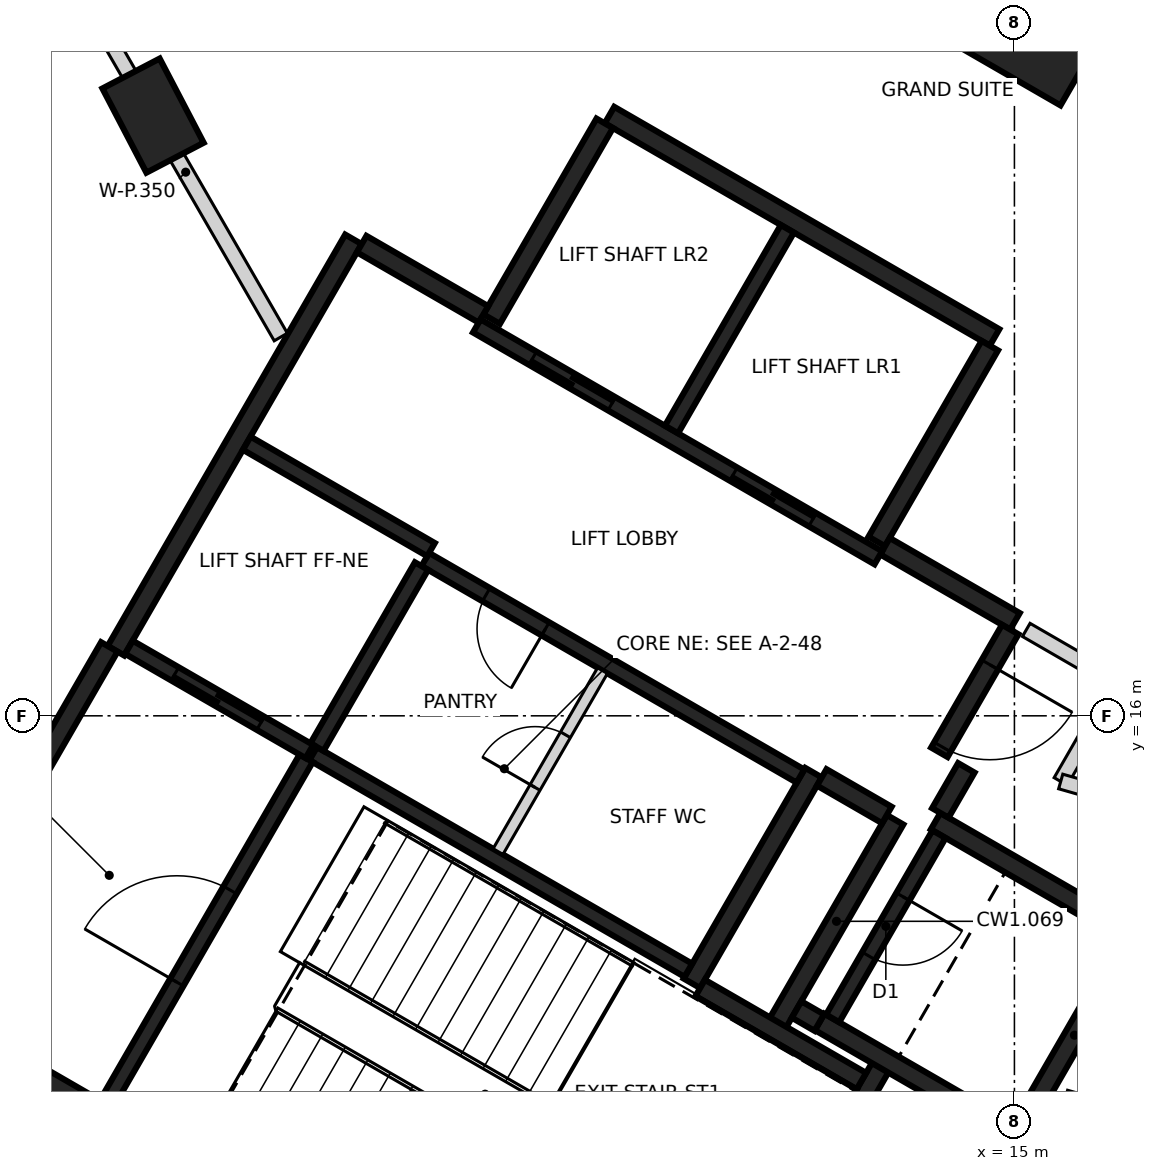
"""IFC4 building model, lengths in metres.
Left out: names, types, materials, properties, quantities, classifications, styles, units other than length and angle.
Written with IfcOpenShell. Run it as: python <this file> out.ifc"""

import sys

from ifc_helpers import new_model, si_unit, direction, frame, frame_2d, origin, origin_2d, place, context, subcontext, project, spatial, rectangle, extrude, element, fill, save


model = new_model("IFC4")
c1 = context("Model", 3, precision=1e-05, world=origin(), true_north=direction((0.0, 1.0)))
c2 = subcontext(c1, "Body", "Model", "MODEL_VIEW")
j1 = project(units=[si_unit("LENGTHUNIT", "METRE"), si_unit("PLANEANGLEUNIT", "RADIAN")], contexts=[c1])
p1 = place(None, origin())
s1 = spatial("IfcSite", under=j1, at=p1, CompositionType="ELEMENT")
p2 = place(p1, origin())
s2 = spatial("IfcBuilding", under=s1, at=p2, CompositionType="ELEMENT")
p3 = place(p2, frame((0.0, 0.0, 161.2)))
s3 = spatial("IfcBuildingStorey", under=s2, at=p3, CompositionType="ELEMENT", Elevation=161.2)
p4 = place(p3, frame((3.667, 23.896, -0.4), z_axis=(0.0, 0.0, 1.0), x_axis=(-0.463006774365, 0.886354740999, 0.0)))
e1 = element("IfcColumn", 1, at=p4, inside=s3, PredefinedType="COLUMN", context=c2, shape_type="SweptSolid", body=[
    extrude(rectangle(XDim=1.25, YDim=0.85, at=origin_2d()), origin(), (0.0, 0.0, 1.0), 2.884),
])
p5 = place(p3, frame((15.207, 26.34, -0.4), z_axis=(0.0, 0.0, 1.0), x_axis=(0.5, 0.866025403784, 0.0)))
e2 = element("IfcColumn", 2, at=p5, inside=s3, PredefinedType="COLUMN", context=c2, shape_type="SweptSolid", body=[
    extrude(rectangle(XDim=3.6, YDim=3.0, at=origin_2d()), origin(), (0.0, 0.0, 1.0), 3.6),
])
p6 = place(p3, frame((10.42, 6.498, 0.0), z_axis=(0.0, 0.0, 1.0), x_axis=(-0.866021906294, 0.500006057782, 0.0)))
e3 = element("IfcWall", 3, at=p6, inside=s3, PredefinedType="SHEAR", context=c2, shape_type="SweptSolid", body=[
    extrude(rectangle(XDim=11.55, YDim=0.25, at=frame_2d((5.775, 0.0))), origin(), (0.0, 0.0, 1.0), 3.2),
])
p7 = place(p6, frame((10.025, 0.0, 0.0)))
e4 = element("IfcOpeningElement", 4, at=p7, cuts=e3, PredefinedType="OPENING", context=c2, shape_type="SweptSolid", body=[
    extrude(rectangle(XDim=1.2, YDim=2.1, at=frame_2d((0.6, 1.05))), frame((0.0, 0.135, 0.0), z_axis=(0.0, -1.0, 0.0), x_axis=(1.0, 0.0, 0.0)), (0.0, 0.0, 1.0), 0.27),
])
p8 = place(p6, frame((8.725, 0.0, 0.0)))
e5 = element("IfcOpeningElement", 5, at=p8, cuts=e3, PredefinedType="OPENING", context=c2, shape_type="SweptSolid", body=[
    extrude(rectangle(XDim=1.2, YDim=2.1, at=frame_2d((0.6, 1.05))), frame((0.0, 0.135, 0.0), z_axis=(0.0, -1.0, 0.0), x_axis=(1.0, 0.0, 0.0)), (0.0, 0.0, 1.0), 0.27),
])
p9 = place(p3, frame((3.179, 16.856, 0.0), z_axis=(0.0, 0.0, 1.0), x_axis=(0.500004234368, 0.866022959057, 0.0)))
e6 = element("IfcWall", 6, at=p9, inside=s3, PredefinedType="SHEAR", context=c2, shape_type="SweptSolid", body=[
    extrude(rectangle(XDim=6.25, YDim=0.25, at=frame_2d((3.125, 0.0))), origin(), (0.0, 0.0, 1.0), 3.2),
])
p10 = place(p3, frame((9.673, 23.903, 0.0), z_axis=(0.0, 0.0, 1.0), x_axis=(0.86603616409, -0.499981362141, 0.0)))
e7 = element("IfcWall", 7, at=p10, inside=s3, PredefinedType="SHEAR", context=c2, shape_type="SweptSolid", body=[
    extrude(rectangle(XDim=5.85, YDim=0.25, at=frame_2d((2.925, 0.0))), origin(), (0.0, 0.0, 1.0), 3.2),
])
p11 = place(p3, frame((0.48, 12.381, 0.0), z_axis=(0.0, 0.0, 1.0), x_axis=(0.49999885962, 0.866026062182, 0.0)))
e8 = element("IfcWall", 8, at=p11, inside=s3, PredefinedType="SHEAR", context=c2, shape_type="SweptSolid", body=[
    extrude(rectangle(XDim=5.225, YDim=0.25, at=frame_2d((2.612, 0.0))), origin(), (0.0, 0.0, 1.0), 3.2),
])
p12 = place(p3, frame((13.238, 11.378, 0.0), z_axis=(0.0, 0.0, 1.0), x_axis=(-0.500008851346, -0.866020293397, 0.0)))
e9 = element("IfcWall", 9, at=p12, inside=s3, PredefinedType="SHEAR", context=c2, shape_type="SweptSolid", body=[
    extrude(rectangle(XDim=5.51, YDim=0.25, at=frame_2d((2.755, 0.0))), origin(), (0.0, 0.0, 1.0), 3.2),
])
p13 = place(p3, frame((12.357, 15.252, 0.0), z_axis=(0.0, 0.0, 1.0), x_axis=(-0.500028443584, -0.866008981251, 0.0)))
e10 = element("IfcWall", 10, at=p13, inside=s3, PredefinedType="SHEAR", context=c2, shape_type="SweptSolid", body=[
    extrude(rectangle(XDim=3.2, YDim=0.25, at=frame_2d((1.6, 0.0))), origin(), (0.0, 0.0, 1.0), 3.2),
])
for number, where, z_axis, x_axis in (
    (11, (8.123, 21.219, 0.0), (0.0, 0.0, 1.0), (0.5, 0.866, 0.0)),
    (12, (14.676, 20.87, 0.0), (0.0, 0.0, 1.0), (-0.5, -0.866, 0.0)),
):
    element("IfcWall", number, at=place(p3, frame(where, z_axis=z_axis, x_axis=x_axis)), inside=s3, PredefinedType="SHEAR", context=c2, shape_type="SweptSolid", body=[
        extrude(rectangle(XDim=2.975, YDim=0.25, at=frame_2d((1.487, 0.0))), origin(), (0.0, 0.0, 1.0), 3.2),
    ])
p14 = place(p3, frame((16.552, 13.119, 0.0), z_axis=(0.0, 0.0, 1.0), x_axis=(-0.499978833458, -0.866037623948, 0.0)))
e13 = element("IfcWall", 13, at=p14, inside=s3, PredefinedType="SHEAR", context=c2, shape_type="SweptSolid", body=[
    extrude(rectangle(XDim=3.05, YDim=0.25, at=frame_2d((1.525, 0.0))), origin(), (0.0, 0.0, 1.0), 3.2),
])
p15 = place(p3, frame((14.918, 10.54, 0.0), z_axis=(0.0, 0.0, 1.0), x_axis=(-0.866063538972, 0.499933942099, 0.0)))
e14 = element("IfcWall", 14, at=p15, inside=s3, PredefinedType="SHEAR", context=c2, shape_type="SweptSolid", body=[
    extrude(rectangle(XDim=2.865, YDim=0.25, at=frame_2d((1.432, 0.0))), origin(), (0.0, 0.0, 1.0), 3.2),
])
p16 = place(p3, frame((13.963, 14.614, 0.0), z_axis=(0.0, 0.0, 1.0), x_axis=(0.866042235819, -0.499970844928, 0.0)))
e15 = element("IfcWall", 15, at=p16, inside=s3, PredefinedType="SHEAR", context=c2, shape_type="SweptSolid", body=[
    extrude(rectangle(XDim=2.865, YDim=0.25, at=frame_2d((1.432, 0.0))), origin(), (0.0, 0.0, 1.0), 3.2),
])
p17 = place(p3, frame((11.888, 11.961, 0.0), z_axis=(0.0, 0.0, 1.0), x_axis=(0.500003324108, 0.866023484601, 0.0)))
e16 = element("IfcWall", 16, at=p17, inside=s3, PredefinedType="SHEAR", context=c2, shape_type="SweptSolid", body=[
    extrude(rectangle(XDim=3.085, YDim=0.25, at=frame_2d((1.542, 0.0))), origin(), (0.0, 0.0, 1.0), 3.2),
])
p18 = place(p3, frame((10.865, 12.418, 0.0), z_axis=(0.0, 0.0, 1.0), x_axis=(0.866026229868, -0.499998569178, 0.0)))
e17 = element("IfcWall", 17, at=p18, inside=s3, PredefinedType="SHEAR", context=c2, shape_type="SweptSolid", body=[
    extrude(rectangle(XDim=2.449, YDim=0.25, at=frame_2d((1.225, 0.0))), origin(), (0.0, 0.0, 1.0), 3.2),
])
p19 = place(p3, frame((13.297, 18.231, 0.0), z_axis=(0.0, 0.0, 1.0), x_axis=(0.866043531843, -0.499968599967, 0.0)))
e18 = element("IfcWall", 18, at=p19, inside=s3, PredefinedType="SHEAR", context=c2, shape_type="SweptSolid", body=[
    extrude(rectangle(XDim=1.975, YDim=0.25, at=frame_2d((0.987, 0.0))), origin(), (0.0, 0.0, 1.0), 3.2),
])
p20 = place(p3, frame((6.413, 22.206, 0.0), z_axis=(0.0, 0.0, 1.0), x_axis=(0.866016279763, -0.500015802937, 0.0)))
e19 = element("IfcWall", 19, at=p20, inside=s3, PredefinedType="SHEAR", context=c2, shape_type="SweptSolid", body=[
    extrude(rectangle(XDim=1.849, YDim=0.25, at=frame_2d((0.925, 0.0))), origin(), (0.0, 0.0, 1.0), 3.2),
])
p21 = place(p3, frame((14.945, 17.135, 0.0), z_axis=(0.0, 0.0, 1.0), x_axis=(-0.499983108224, -0.866035156036, 0.0)))
e20 = element("IfcWall", 20, at=p21, inside=s3, PredefinedType="SHEAR", context=c2, shape_type="SweptSolid", body=[
    extrude(rectangle(XDim=1.865, YDim=0.25, at=frame_2d((0.932, 0.0))), origin(), (0.0, 0.0, 1.0), 3.2),
])
p22 = place(p21, frame((0.535, 0.0, 0.0)))
e21 = element("IfcOpeningElement", 21, at=p22, cuts=e20, PredefinedType="OPENING", context=c2, shape_type="SweptSolid", body=[
    extrude(rectangle(XDim=1.25, YDim=2.1, at=frame_2d((0.625, 1.05))), frame((0.0, 0.135, 0.0), z_axis=(0.0, -1.0, 0.0), x_axis=(1.0, 0.0, 0.0)), (0.0, 0.0, 1.0), 0.27),
])
p23 = place(p3, frame((13.322, 14.695, 0.0), z_axis=(0.0, 0.0, 1.0), x_axis=(-0.866017078145, 0.500014420154, 0.0)))
e22 = element("IfcWall", 22, at=p23, inside=s3, PredefinedType="SHEAR", context=c2, shape_type="SweptSolid", body=[
    extrude(rectangle(XDim=0.989, YDim=0.25, at=frame_2d((0.495, 0.0))), origin(), (0.0, 0.0, 1.0), 3.2),
])
p24 = place(p3, frame((14.368, 15.315, 0.0), z_axis=(0.0, 0.0, 1.0), x_axis=(-0.499897359611, -0.866084655132, 0.0)))
e23 = element("IfcWall", 23, at=p24, inside=s3, PredefinedType="SHEAR", context=c2, shape_type="SweptSolid", body=[
    extrude(rectangle(XDim=0.685, YDim=0.25, at=frame_2d((0.342, 0.0))), origin(), (0.0, 0.0, 1.0), 3.2),
])
p25 = place(p3, frame((12.433, 11.964, 0.0), z_axis=(0.0, 0.0, 1.0), x_axis=(-0.866055875208, 0.499947218231, 0.0)))
e24 = element("IfcWall", 24, at=p25, inside=s3, PredefinedType="SHEAR", context=c2, shape_type="SweptSolid", body=[
    extrude(rectangle(XDim=0.345, YDim=0.25, at=frame_2d((0.172, 0.0))), origin(), (0.0, 0.0, 1.0), 3.2),
])
p26 = place(p3, frame((13.21, 18.08, 0.0), z_axis=(0.0, 0.0, 1.0), x_axis=(-0.866030299012, 0.499991521122, 0.0)))
e25 = element("IfcWall", 25, at=p26, inside=s3, PredefinedType="SHEAR", context=c2, shape_type="SweptSolid", body=[
    extrude(rectangle(XDim=6.1, YDim=0.2, at=frame_2d((3.05, 0.0))), origin(), (0.0, 0.0, 1.0), 3.2),
])
p27 = place(p26, frame((1.0, 0.0, 0.0)))
e26 = element("IfcOpeningElement", 26, at=p27, cuts=e25, PredefinedType="OPENING", context=c2, shape_type="SweptSolid", body=[
    extrude(rectangle(XDim=1.2, YDim=2.1, at=frame_2d((0.6, 1.05))), frame((0.0, 0.11, 0.0), z_axis=(0.0, -1.0, 0.0), x_axis=(1.0, 0.0, 0.0)), (0.0, 0.0, 1.0), 0.22),
])
p28 = place(p26, frame((4.05, 0.0, 0.0)))
e27 = element("IfcOpeningElement", 27, at=p28, cuts=e25, PredefinedType="OPENING", context=c2, shape_type="SweptSolid", body=[
    extrude(rectangle(XDim=1.2, YDim=2.1, at=frame_2d((0.6, 1.05))), frame((0.0, 0.11, 0.0), z_axis=(0.0, -1.0, 0.0), x_axis=(1.0, 0.0, 0.0)), (0.0, 0.0, 1.0), 0.22),
])
p29 = place(p3, frame((5.775, 15.502, 0.0), z_axis=(0.0, 0.0, 1.0), x_axis=(0.866020080793, -0.500009219579, 0.0)))
e28 = element("IfcWall", 28, at=p29, inside=s3, PredefinedType="SHEAR", context=c2, shape_type="SweptSolid", body=[
    extrude(rectangle(XDim=5.699, YDim=0.2, at=frame_2d((2.85, 0.0))), origin(), (0.0, 0.0, 1.0), 3.2),
])
p30 = place(p3, frame((12.185, 15.207, 0.0), z_axis=(0.0, 0.0, 1.0), x_axis=(-0.866020080793, 0.500009219579, 0.0)))
e29 = element("IfcWall", 29, at=p30, inside=s3, PredefinedType="SHEAR", context=c2, shape_type="SweptSolid", body=[
    extrude(rectangle(XDim=5.699, YDim=0.2, at=frame_2d((2.85, 0.0))), origin(), (0.0, 0.0, 1.0), 3.2),
])
p31 = place(p30, frame((3.874, 0.0, 0.0)))
e30 = element("IfcOpeningElement", 30, at=p31, cuts=e29, PredefinedType="OPENING", context=c2, shape_type="SweptSolid", body=[
    extrude(rectangle(XDim=0.9, YDim=2.1, at=frame_2d((0.45, 1.05))), frame((0.0, 0.11, 0.0), z_axis=(0.0, -1.0, 0.0), x_axis=(1.0, 0.0, 0.0)), (0.0, 0.0, 1.0), 0.22),
])
p32 = place(p3, frame((3.057, 10.895, 0.0), z_axis=(0.0, 0.0, 1.0), x_axis=(0.499989418164, 0.866031513124, 0.0)))
e31 = element("IfcWall", 31, at=p32, inside=s3, PredefinedType="SHEAR", context=c2, shape_type="SweptSolid", body=[
    extrude(rectangle(XDim=5.251, YDim=0.2, at=frame_2d((2.625, 0.0))), origin(), (0.0, 0.0, 1.0), 3.2),
])
p33 = place(p32, frame((1.849, 0.0, 0.0)))
e32 = element("IfcOpeningElement", 32, at=p33, cuts=e31, PredefinedType="OPENING", context=c2, shape_type="SweptSolid", body=[
    extrude(rectangle(XDim=1.4, YDim=2.1, at=frame_2d((0.7, 1.05))), frame((0.0, 0.11, 0.0), z_axis=(0.0, -1.0, 0.0), x_axis=(1.0, 0.0, 0.0)), (0.0, 0.0, 1.0), 0.22),
])
p34 = place(p3, frame((10.489, 19.767, 0.0), z_axis=(0.0, 0.0, 1.0), x_axis=(0.499946628782, 0.866056215479, 0.0)))
e33 = element("IfcWall", 33, at=p34, inside=s3, PredefinedType="SHEAR", context=c2, shape_type="SweptSolid", body=[
    extrude(rectangle(XDim=3.048, YDim=0.2, at=frame_2d((1.524, 0.0))), origin(), (0.0, 0.0, 1.0), 3.2),
])
p35 = place(p3, frame((14.008, 14.442, 0.0), z_axis=(0.0, 0.0, 1.0), x_axis=(-0.499986818241, -0.866033014143, 0.0)))
e34 = element("IfcWall", 34, at=p35, inside=s3, PredefinedType="SHEAR", context=c2, shape_type="SweptSolid", body=[
    extrude(rectangle(XDim=2.798, YDim=0.2, at=frame_2d((1.399, 0.0))), origin(), (0.0, 0.0, 1.0), 3.2),
])
p36 = place(p35, frame((0.949, 0.0, 0.0)))
e35 = element("IfcOpeningElement", 35, at=p36, cuts=e34, PredefinedType="OPENING", context=c2, shape_type="SweptSolid", body=[
    extrude(rectangle(XDim=0.9, YDim=2.1, at=frame_2d((0.45, 1.05))), frame((0.0, 0.11, 0.0), z_axis=(0.0, -1.0, 0.0), x_axis=(1.0, 0.0, 0.0)), (0.0, 0.0, 1.0), 0.22),
])
p37 = place(p3, frame((7.199, 17.97, 0.0), z_axis=(0.0, 0.0, 1.0), x_axis=(-0.499968400327, -0.866043647095, 0.0)))
e36 = element("IfcWall", 36, at=p37, inside=s3, PredefinedType="SHEAR", context=c2, shape_type="SweptSolid", body=[
    extrude(rectangle(XDim=2.75, YDim=0.2, at=frame_2d((1.375, 0.0))), origin(), (0.0, 0.0, 1.0), 3.2),
])
p38 = place(p3, frame((5.725, 15.531, 0.0), z_axis=(0.0, 0.0, 1.0), x_axis=(-0.866037306777, 0.499979382845, 0.0)))
e37 = element("IfcWall", 37, at=p38, inside=s3, PredefinedType="SHEAR", context=c2, shape_type="SweptSolid", body=[
    extrude(rectangle(XDim=2.742, YDim=0.2, at=frame_2d((1.371, 0.0))), origin(), (0.0, 0.0, 1.0), 3.2),
])
p39 = place(p38, frame((0.743, 0.0, 0.0)))
e38 = element("IfcOpeningElement", 38, at=p39, cuts=e37, PredefinedType="OPENING", context=c2, shape_type="SweptSolid", body=[
    extrude(rectangle(XDim=1.3, YDim=2.1, at=frame_2d((0.65, 1.05))), frame((0.0, 0.11, 0.0), z_axis=(0.0, -1.0, 0.0), x_axis=(1.0, 0.0, 0.0)), (0.0, 0.0, 1.0), 0.22),
])
p40 = place(p3, frame((4.901, 19.586, 0.0), z_axis=(0.0, 0.0, 1.0), x_axis=(0.866022890907, -0.500004352405, 0.0)))
e39 = element("IfcWall", 39, at=p40, inside=s3, PredefinedType="SHEAR", context=c2, shape_type="SweptSolid", body=[
    extrude(rectangle(XDim=2.799, YDim=0.2, at=frame_2d((1.399, 0.0))), origin(), (0.0, 0.0, 1.0), 3.2),
])
p41 = place(p3, frame((8.207, 14.214, 0.0), z_axis=(0.0, 0.0, 1.0), x_axis=(0.499922376475, 0.866070215109, 0.0)))
e40 = element("IfcWall", 40, at=p41, inside=s3, PredefinedType="PARTITIONING", context=c2, shape_type="SweptSolid", body=[
    extrude(rectangle(XDim=2.749, YDim=0.15, at=frame_2d((1.374, 0.0))), origin(), (0.0, 0.0, 1.0), 3.2),
])
p42 = place(p41, frame((0.974, 0.0, 0.0)))
e41 = element("IfcOpeningElement", 41, at=p42, cuts=e40, PredefinedType="OPENING", context=c2, shape_type="SweptSolid", body=[
    extrude(rectangle(XDim=0.8, YDim=2.1, at=frame_2d((0.4, 1.05))), frame((0.0, 0.085, 0.0), z_axis=(0.0, -1.0, 0.0), x_axis=(1.0, 0.0, 0.0)), (0.0, 0.0, 1.0), 0.17),
])
p43 = place(p3, frame((15.156, 17.13, 0.0), z_axis=(0.0, 0.0, 1.0), x_axis=(0.865755062894, -0.500467952093, 0.0)))
e42 = element("IfcWall", 42, at=p43, inside=s3, PredefinedType="PARTITIONING", context=c2, shape_type="SweptSolid", body=[
    extrude(rectangle(XDim=1.389, YDim=0.2, at=frame_2d((0.694, 0.0))), origin(), (0.0, 0.0, 1.0), 3.2),
])
p44 = place(p3, frame((15.609, 15.136, 0.0), z_axis=(0.0, 0.0, 1.0), x_axis=(0.499501622561, 0.866312950993, 0.0)))
e43 = element("IfcWall", 43, at=p44, inside=s3, PredefinedType="PARTITIONING", context=c2, shape_type="SweptSolid", body=[
    extrude(rectangle(XDim=1.5, YDim=0.2, at=frame_2d((0.75, 0.0))), origin(), (0.0, 0.0, 1.0), 3.2),
])
p45 = place(p3, frame((15.609, 15.136, 0.0), z_axis=(0.0, 0.0, 1.0), x_axis=(0.961662011825, -0.274237442763, 0.0)))
e44 = element("IfcWall", 44, at=p45, inside=s3, PredefinedType="PARTITIONING", context=c2, shape_type="SweptSolid", body=[
    extrude(rectangle(XDim=1.2, YDim=0.2, at=frame_2d((0.6, 0.0))), origin(), (0.0, 0.0, 1.0), 3.2),
])
p46 = place(p3, frame((15.672, 10.978, 0.0), z_axis=(0.0, 0.0, 1.0), x_axis=(0.961612403256, -0.274411344344, 0.0)))
e45 = element("IfcWall", 45, at=p46, inside=s3, PredefinedType="PARTITIONING", context=c2, shape_type="SweptSolid", body=[
    extrude(rectangle(XDim=0.937, YDim=0.2, at=frame_2d((0.468, 0.0))), origin(), (0.0, 0.0, 1.0), 3.2),
])
p47 = place(p3, frame((2.845, 25.321, 0.0), z_axis=(0.0, 0.0, 1.0), x_axis=(0.499751996305, -0.866168541445, 0.0)))
e46 = element("IfcWall", 46, at=p47, inside=s3, PredefinedType="PARTITIONING", context=c2, shape_type="SweptSolid", body=[
    extrude(rectangle(XDim=5.008, YDim=0.2, at=frame_2d((2.504, 0.0))), origin(), (0.0, 0.0, 1.0), 3.2),
])
p48 = place(p39, origin())
e47 = element("IfcDoor", 47, at=p48, inside=s3, OperationType="SLIDING_TO_LEFT", PredefinedType="DOOR", context=c2, shape_type="SweptSolid", body=[
    extrude(rectangle(XDim=1.3, YDim=2.1, at=frame_2d((0.65, 1.05))), frame((0.0, 0.025, 0.0), z_axis=(0.0, -1.0, 0.0), x_axis=(1.0, 0.0, 0.0)), (0.0, 0.0, 1.0), 0.05),
])
fill(e38, e47)
p49 = place(p27, origin())
e48 = element("IfcDoor", 48, at=p49, inside=s3, OperationType="DOUBLE_DOOR_SLIDING", PredefinedType="DOOR", context=c2, shape_type="SweptSolid", body=[
    extrude(rectangle(XDim=1.2, YDim=2.1, at=frame_2d((0.6, 1.05))), frame((0.0, 0.025, 0.0), z_axis=(0.0, -1.0, 0.0), x_axis=(1.0, 0.0, 0.0)), (0.0, 0.0, 1.0), 0.05),
])
fill(e26, e48)
p50 = place(p28, origin())
e49 = element("IfcDoor", 49, at=p50, inside=s3, OperationType="DOUBLE_DOOR_SLIDING", PredefinedType="DOOR", context=c2, shape_type="SweptSolid", body=[
    extrude(rectangle(XDim=1.2, YDim=2.1, at=frame_2d((0.6, 1.05))), frame((0.0, 0.025, 0.0), z_axis=(0.0, -1.0, 0.0), x_axis=(1.0, 0.0, 0.0)), (0.0, 0.0, 1.0), 0.05),
])
fill(e27, e49)
p51 = place(p22, origin())
e50 = element("IfcDoor", 50, at=p51, inside=s3, OperationType="SINGLE_SWING_LEFT", PredefinedType="DOOR", context=c2, shape_type="SweptSolid", body=[
    extrude(rectangle(XDim=1.25, YDim=2.1, at=frame_2d((0.625, 1.05))), frame((0.0, 0.025, 0.0), z_axis=(0.0, -1.0, 0.0), x_axis=(1.0, 0.0, 0.0)), (0.0, 0.0, 1.0), 0.05),
])
fill(e21, e50)
p52 = place(p8, origin())
e51 = element("IfcDoor", 51, at=p52, inside=s3, OperationType="SINGLE_SWING_RIGHT", PredefinedType="DOOR", context=c2, shape_type="SweptSolid", body=[
    extrude(rectangle(XDim=1.2, YDim=2.1, at=frame_2d((0.6, 1.05))), frame((0.0, 0.025, 0.0), z_axis=(0.0, -1.0, 0.0), x_axis=(1.0, 0.0, 0.0)), (0.0, 0.0, 1.0), 0.05),
])
fill(e5, e51)
p53 = place(p33, origin())
e52 = element("IfcDoor", 52, at=p53, inside=s3, OperationType="SINGLE_SWING_LEFT", PredefinedType="DOOR", context=c2, shape_type="SweptSolid", body=[
    extrude(rectangle(XDim=1.4, YDim=2.1, at=frame_2d((0.7, 1.05))), frame((0.0, 0.025, 0.0), z_axis=(0.0, -1.0, 0.0), x_axis=(1.0, 0.0, 0.0)), (0.0, 0.0, 1.0), 0.05),
])
fill(e32, e52)
p54 = place(p31, origin())
e53 = element("IfcDoor", 53, at=p54, inside=s3, OperationType="SINGLE_SWING_RIGHT", PredefinedType="DOOR", context=c2, shape_type="SweptSolid", body=[
    extrude(rectangle(XDim=0.9, YDim=2.1, at=frame_2d((0.45, 1.05))), frame((0.0, 0.025, 0.0), z_axis=(0.0, -1.0, 0.0), x_axis=(1.0, 0.0, 0.0)), (0.0, 0.0, 1.0), 0.05),
])
fill(e30, e53)
p55 = place(p36, origin())
e54 = element("IfcDoor", 54, at=p55, inside=s3, OperationType="SINGLE_SWING_LEFT", PredefinedType="DOOR", context=c2, shape_type="SweptSolid", body=[
    extrude(rectangle(XDim=0.9, YDim=2.1, at=frame_2d((0.45, 1.05))), frame((0.0, 0.025, 0.0), z_axis=(0.0, -1.0, 0.0), x_axis=(1.0, 0.0, 0.0)), (0.0, 0.0, 1.0), 0.05),
])
fill(e35, e54)
p56 = place(p42, origin())
e55 = element("IfcDoor", 55, at=p56, inside=s3, OperationType="SINGLE_SWING_RIGHT", PredefinedType="DOOR", context=c2, shape_type="SweptSolid", body=[
    extrude(rectangle(XDim=0.8, YDim=2.1, at=frame_2d((0.4, 1.05))), frame((0.0, 0.025, 0.0), z_axis=(0.0, -1.0, 0.0), x_axis=(1.0, 0.0, 0.0)), (0.0, 0.0, 1.0), 0.05),
])
fill(e41, e55)
save(model, sys.argv[1])
